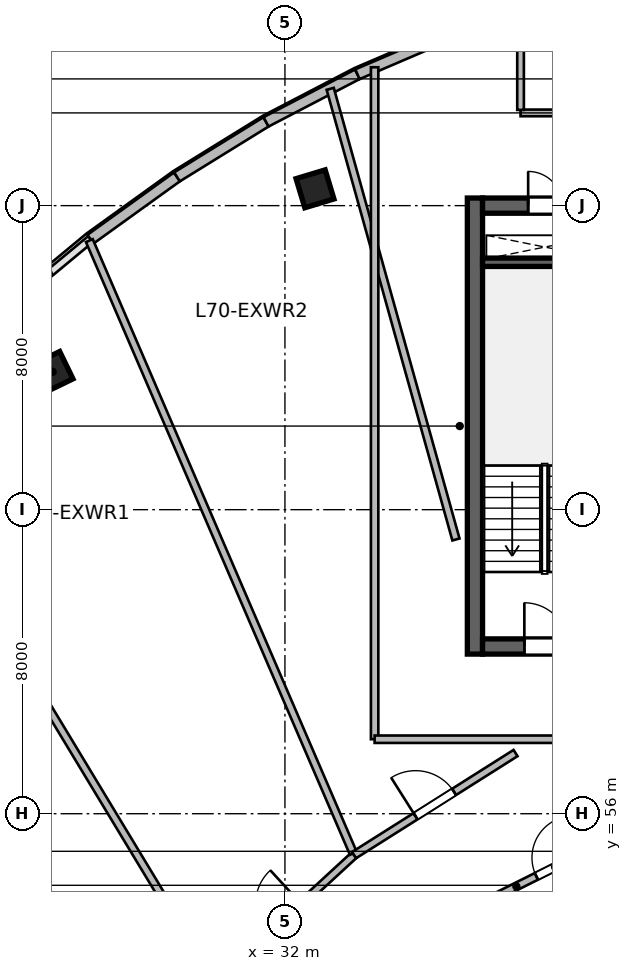
"""IFC4 building model, lengths in metres.
Left out: names, types, materials, properties, quantities, classifications, styles, units other than length and angle.
Written with IfcOpenShell. Run it as: python <this file> out.ifc"""

import sys

from ifc_helpers import new_model, si_unit, direction, frame, frame_2d, origin, origin_2d, place, context, subcontext, project, spatial, rectangle, extrude, source, transform, mapped, element, fill, save


model = new_model("IFC4")
c1 = context("Model", 3, precision=1e-05, world=origin(), true_north=direction((0.0, 1.0)))
c2 = subcontext(c1, "Body", "Model", "MODEL_VIEW")
j1 = project(units=[si_unit("LENGTHUNIT", "METRE"), si_unit("PLANEANGLEUNIT", "RADIAN")], contexts=[c1])
p1 = place(None, origin())
s1 = spatial("IfcSite", under=j1, at=p1, CompositionType="ELEMENT")
p2 = place(p1, origin())
s2 = spatial("IfcBuilding", under=s1, at=p2, CompositionType="ELEMENT")
p3 = place(p2, frame((0.0, 0.0, 287.4)))
s3 = spatial("IfcBuildingStorey", under=s2, at=p3, CompositionType="ELEMENT", Elevation=287.4)
m1 = source(origin(), c2, "Body", "SweptSolid", [
    extrude(rectangle(XDim=12.0, YDim=0.4, at=frame_2d((6.0, 0.0))), origin(), (0.0, 0.0, 1.0), 3.9),
])
p4 = place(p3, frame((37.0, 60.2, 0.0), z_axis=(0.0, 0.0, 1.0), x_axis=(0.0, 1.0, 0.0)))
e1 = element("IfcWall", 1, at=p4, inside=s3, PredefinedType="SHEAR", context=c2, shape_type="MappedRepresentation", body=[
    mapped(m1, transform((0.0, 0.0, 0.0), scale=1.0)),
])
m2 = source(origin(), c2, "Body", "SweptSolid", [
    extrude(rectangle(XDim=21.6, YDim=0.4, at=frame_2d((10.8, 0.0))), origin(), (0.0, 0.0, 1.0), 3.9),
])
p5 = place(p3, frame((37.2, 60.4, 0.0), z_axis=(0.0, 0.0, 1.0), x_axis=(1.0, 0.0, 0.0)))
e2 = element("IfcWall", 2, at=p5, inside=s3, PredefinedType="SHEAR", context=c2, shape_type="MappedRepresentation", body=[
    mapped(m2, transform((0.0, 0.0, 0.0), scale=1.0)),
])
p6 = place(p5, frame((1.1, 0.0, 0.0)))
e3 = element("IfcOpeningElement", 3, at=p6, cuts=e2, PredefinedType="OPENING", context=c2, shape_type="SweptSolid", body=[
    extrude(rectangle(XDim=1.15, YDim=2.15, at=frame_2d((0.575, 1.075))), frame((0.0, 0.21, 0.0), z_axis=(0.0, -1.0, 0.0), x_axis=(1.0, 0.0, 0.0)), (0.0, 0.0, 1.0), 0.42),
])
p7 = place(p5, frame((19.5, 0.0, 0.0)))
e4 = element("IfcOpeningElement", 4, at=p7, cuts=e2, PredefinedType="OPENING", context=c2, shape_type="SweptSolid", body=[
    extrude(rectangle(XDim=0.9, YDim=2.1, at=frame_2d((0.45, 1.05))), frame((0.0, 0.21, 0.0), z_axis=(0.0, -1.0, 0.0), x_axis=(1.0, 0.0, 0.0)), (0.0, 0.0, 1.0), 0.42),
])
p8 = place(p5, frame((12.02, 0.0, 0.0)))
e5 = element("IfcOpeningElement", 5, at=p8, cuts=e2, PredefinedType="OPENING", context=c2, shape_type="SweptSolid", body=[
    extrude(rectangle(XDim=1.6, YDim=2.15, at=frame_2d((0.8, 1.075))), frame((0.0, 0.21, 0.0), z_axis=(0.0, -1.0, 0.0), x_axis=(1.0, 0.0, 0.0)), (0.0, 0.0, 1.0), 0.42),
])
p9 = place(p3, frame((37.2, 72.0, 0.0), z_axis=(0.0, 0.0, 1.0), x_axis=(1.0, 0.0, 0.0)))
e6 = element("IfcWall", 6, at=p9, inside=s3, PredefinedType="SHEAR", context=c2, shape_type="MappedRepresentation", body=[
    mapped(m2, transform((0.0, 0.0, 0.0), scale=1.0)),
])
p10 = place(p9, frame((1.2, 0.0, 0.0)))
e7 = element("IfcOpeningElement", 7, at=p10, cuts=e6, PredefinedType="OPENING", context=c2, shape_type="SweptSolid", body=[
    extrude(rectangle(XDim=0.9, YDim=2.1, at=frame_2d((0.45, 1.05))), frame((0.0, 0.21, 0.0), z_axis=(0.0, -1.0, 0.0), x_axis=(1.0, 0.0, 0.0)), (0.0, 0.0, 1.0), 0.42),
])
p11 = place(p9, frame((14.7, 0.0, 0.0)))
e8 = element("IfcOpeningElement", 8, at=p11, cuts=e6, PredefinedType="OPENING", context=c2, shape_type="SweptSolid", body=[
    extrude(rectangle(XDim=1.2, YDim=2.15, at=frame_2d((0.6, 1.075))), frame((0.0, 0.21, 0.0), z_axis=(0.0, -1.0, 0.0), x_axis=(1.0, 0.0, 0.0)), (0.0, 0.0, 1.0), 0.42),
])
p12 = place(p9, frame((4.15, 0.0, 0.0)))
e9 = element("IfcOpeningElement", 9, at=p12, cuts=e6, PredefinedType="OPENING", context=c2, shape_type="SweptSolid", body=[
    extrude(rectangle(XDim=1.3, YDim=2.15, at=frame_2d((0.65, 1.075))), frame((0.0, 0.21, 0.0), z_axis=(0.0, -1.0, 0.0), x_axis=(1.0, 0.0, 0.0)), (0.0, 0.0, 1.0), 0.42),
])
p13 = place(p9, frame((7.1, 0.0, 0.0)))
e10 = element("IfcOpeningElement", 10, at=p13, cuts=e6, PredefinedType="OPENING", context=c2, shape_type="SweptSolid", body=[
    extrude(rectangle(XDim=0.9, YDim=2.1, at=frame_2d((0.45, 1.05))), frame((0.0, 0.21, 0.0), z_axis=(0.0, -1.0, 0.0), x_axis=(1.0, 0.0, 0.0)), (0.0, 0.0, 1.0), 0.42),
])
m3 = source(origin(), c2, "Body", "SweptSolid", [
    extrude(rectangle(XDim=3.27, YDim=0.22, at=frame_2d((1.635, 0.0))), origin(), (0.0, 0.0, 1.0), 3.9),
])
p14 = place(p3, frame((37.2, 70.51, 0.0), z_axis=(0.0, 0.0, 1.0), x_axis=(1.0, 0.0, 0.0)))
e11 = element("IfcWall", 11, at=p14, inside=s3, PredefinedType="SHEAR", context=c2, shape_type="MappedRepresentation", body=[
    mapped(m3, transform((0.0, 0.0, 0.0), scale=1.0)),
])
m4 = source(origin(), c2, "Body", "SweptSolid", [
    extrude(rectangle(XDim=0.8, YDim=0.8, at=origin_2d()), origin(), (0.0, 0.0, 1.0), 3.9),
])
for number, where, z_axis, x_axis in (
    (12, (25.888, 67.627, 0.0), (0.0, 0.0, 1.0), (-0.436, 0.9, 0.0)),
    (13, (32.791, 72.442, 0.0), (0.0, 0.0, 1.0), (-0.289, 0.957, 0.0)),
):
    element("IfcColumn", number, at=place(p3, frame(where, z_axis=z_axis, x_axis=x_axis)), inside=s3, PredefinedType="COLUMN", context=c2, shape_type="MappedRepresentation", body=[
        mapped(m4, transform((0.0, 0.0, 0.0), scale=1.0)),
    ])
m5 = source(origin(), c2, "Body", "SweptSolid", [
    extrude(rectangle(XDim=2.802, YDim=0.28, at=frame_2d((1.401, 0.0))), origin(), (0.0, 0.0, 1.0), 3.64),
])
p15 = place(p3, frame((26.885, 71.12, 0.0), z_axis=(0.0, 0.0, 1.0), x_axis=(0.811507896482, 0.584341453217, 0.0)))
e14 = element("IfcWall", 14, at=p15, inside=s3, PredefinedType="SOLIDWALL", context=c2, shape_type="MappedRepresentation", body=[
    mapped(m5, transform((0.0, 0.0, 0.0), scale=1.0)),
])
m6 = source(origin(), c2, "Body", "SweptSolid", [
    extrude(rectangle(XDim=2.755, YDim=0.28, at=frame_2d((1.377, 0.0))), origin(), (0.0, 0.0, 1.0), 3.64),
])
p16 = place(p3, frame((29.159, 72.757, 0.0), z_axis=(0.0, 0.0, 1.0), x_axis=(0.850750210743, 0.525570241661, 0.0)))
e15 = element("IfcWall", 15, at=p16, inside=s3, PredefinedType="SOLIDWALL", context=c2, shape_type="MappedRepresentation", body=[
    mapped(m6, transform((0.0, 0.0, 0.0), scale=1.0)),
])
m7 = source(origin(), c2, "Body", "SweptSolid", [
    extrude(rectangle(XDim=2.711, YDim=0.28, at=frame_2d((1.356, 0.0))), origin(), (0.0, 0.0, 1.0), 3.64),
])
p17 = place(p3, frame((31.502, 74.205, 0.0), z_axis=(0.0, 0.0, 1.0), x_axis=(0.886828760751, 0.462098202881, 0.0)))
e16 = element("IfcWall", 16, at=p17, inside=s3, PredefinedType="SOLIDWALL", context=c2, shape_type="MappedRepresentation", body=[
    mapped(m7, transform((0.0, 0.0, 0.0), scale=1.0)),
])
m8 = source(origin(), c2, "Body", "SweptSolid", [
    extrude(rectangle(XDim=2.673, YDim=0.28, at=frame_2d((1.337, 0.0))), origin(), (0.0, 0.0, 1.0), 3.64),
])
p18 = place(p3, frame((33.907, 75.458, 0.0), z_axis=(0.0, 0.0, 1.0), x_axis=(0.919036345912, 0.394172798266, 0.0)))
e17 = element("IfcWall", 17, at=p18, inside=s3, PredefinedType="SOLIDWALL", context=c2, shape_type="MappedRepresentation", body=[
    mapped(m8, transform((0.0, 0.0, 0.0), scale=1.0)),
])
m9 = source(origin(), c2, "Body", "SweptSolid", [
    extrude(rectangle(XDim=4.0, YDim=0.175, at=frame_2d((2.0, 0.0))), origin(), (0.0, 0.0, 1.0), 3.64),
])
p19 = place(p3, frame((38.2, 74.44, 0.0), z_axis=(0.0, 0.0, 1.0), x_axis=(1.0, 0.0, 0.0)))
e18 = element("IfcWall", 18, at=p19, inside=s3, PredefinedType="PARTITIONING", context=c2, shape_type="MappedRepresentation", body=[
    mapped(m9, transform((0.0, 0.0, 0.0), scale=1.0)),
])
p20 = place(p19, frame((2.7, 0.0, 0.0)))
e19 = element("IfcOpeningElement", 19, at=p20, cuts=e18, PredefinedType="OPENING", context=c2, shape_type="SweptSolid", body=[
    extrude(rectangle(XDim=0.9, YDim=2.08, at=frame_2d((0.45, 1.04))), frame((0.0, 0.098, 0.0), z_axis=(0.0, -1.0, 0.0), x_axis=(1.0, 0.0, 0.0)), (0.0, 0.0, 1.0), 0.195),
])
m10 = source(origin(), c2, "Body", "SweptSolid", [
    extrude(rectangle(XDim=2.403, YDim=0.175, at=frame_2d((1.201, 0.0))), origin(), (0.0, 0.0, 1.0), 3.64),
])
p21 = place(p3, frame((38.2, 74.519, 0.0), z_axis=(0.0, 0.0, 1.0), x_axis=(0.0, 1.0, 0.0)))
e20 = element("IfcWall", 20, at=p21, inside=s3, PredefinedType="PARTITIONING", context=c2, shape_type="MappedRepresentation", body=[
    mapped(m10, transform((0.0, 0.0, 0.0), scale=1.0)),
])
m11 = source(origin(), c2, "Body", "SweptSolid", [
    extrude(rectangle(XDim=4.271, YDim=0.195, at=frame_2d((2.135, 0.0))), origin(), (0.0, 0.0, 1.0), 3.64),
])
p22 = place(p3, frame((37.021, 53.552, 0.0), z_axis=(0.0, 0.0, 1.0), x_axis=(0.894061035522, 0.447945158207, 0.0)))
e21 = element("IfcWall", 21, at=p22, inside=s3, PredefinedType="PARTITIONING", context=c2, shape_type="MappedRepresentation", body=[
    mapped(m11, transform((0.0, 0.0, 0.0), scale=1.0)),
])
p23 = place(p22, frame((1.785, 0.0, 0.0)))
e22 = element("IfcOpeningElement", 22, at=p23, cuts=e21, PredefinedType="OPENING", context=c2, shape_type="SweptSolid", body=[
    extrude(rectangle(XDim=1.1, YDim=2.15, at=frame_2d((0.55, 1.075))), frame((0.0, 0.107, 0.0), z_axis=(0.0, -1.0, 0.0), x_axis=(1.0, 0.0, 0.0)), (0.0, 0.0, 1.0), 0.215),
])
m12 = source(origin(), c2, "Body", "SweptSolid", [
    extrude(rectangle(XDim=4.986, YDim=0.195, at=frame_2d((2.493, 0.0))), origin(), (0.0, 0.0, 1.0), 3.64),
])
p24 = place(p3, frame((30.153, 51.533, 0.0), z_axis=(0.0, 0.0, 1.0), x_axis=(0.735595190169, 0.677421372707, 0.0)))
e23 = element("IfcWall", 23, at=p24, inside=s3, PredefinedType="PARTITIONING", context=c2, shape_type="MappedRepresentation", body=[
    mapped(m12, transform((0.0, 0.0, 0.0), scale=1.0)),
])
p25 = place(p24, frame((1.893, 0.0, 0.0)))
e24 = element("IfcOpeningElement", 24, at=p25, cuts=e23, PredefinedType="OPENING", context=c2, shape_type="SweptSolid", body=[
    extrude(rectangle(XDim=1.2, YDim=2.15, at=frame_2d((0.6, 1.075))), frame((0.0, 0.107, 0.0), z_axis=(0.0, -1.0, 0.0), x_axis=(1.0, 0.0, 0.0)), (0.0, 0.0, 1.0), 0.215),
])
m13 = source(origin(), c2, "Body", "SweptSolid", [
    extrude(rectangle(XDim=16.121, YDim=0.195, at=frame_2d((8.061, 0.0))), origin(), (0.0, 0.0, 1.0), 3.64),
])
p26 = place(p3, frame((30.127, 51.575, 0.0), z_axis=(0.0, 0.0, 1.0), x_axis=(-0.517212483904, 0.855857024563, 0.0)))
e25 = element("IfcWall", 25, at=p26, inside=s3, PredefinedType="PARTITIONING", context=c2, shape_type="MappedRepresentation", body=[
    mapped(m13, transform((0.0, 0.0, 0.0), scale=1.0)),
])
m14 = source(origin(), c2, "Body", "SweptSolid", [
    extrude(rectangle(XDim=17.556, YDim=0.195, at=frame_2d((8.778, 0.0))), origin(), (0.0, 0.0, 1.0), 3.64),
])
p27 = place(p3, frame((33.8, 54.958, 0.0), z_axis=(0.0, 0.0, 1.0), x_axis=(-0.395687598313, 0.918385172213, 0.0)))
e26 = element("IfcWall", 26, at=p27, inside=s3, PredefinedType="PARTITIONING", context=c2, shape_type="MappedRepresentation", body=[
    mapped(m14, transform((0.0, 0.0, 0.0), scale=1.0)),
])
m15 = source(origin(), c2, "Body", "SweptSolid", [
    extrude(rectangle(XDim=5.025, YDim=0.195, at=frame_2d((2.513, 0.0))), origin(), (0.0, 0.0, 1.0), 3.64),
])
p28 = place(p3, frame((33.82, 54.911, 0.0), z_axis=(0.0, 0.0, 1.0), x_axis=(0.84532378062, 0.534254345717, 0.0)))
e27 = element("IfcWall", 27, at=p28, inside=s3, PredefinedType="PARTITIONING", context=c2, shape_type="MappedRepresentation", body=[
    mapped(m15, transform((0.0, 0.0, 0.0), scale=1.0)),
])
p29 = place(p28, frame((1.913, 0.0, 0.0)))
e28 = element("IfcOpeningElement", 28, at=p29, cuts=e27, PredefinedType="OPENING", context=c2, shape_type="SweptSolid", body=[
    extrude(rectangle(XDim=1.2, YDim=2.15, at=frame_2d((0.6, 1.075))), frame((0.0, 0.107, 0.0), z_axis=(0.0, -1.0, 0.0), x_axis=(1.0, 0.0, 0.0)), (0.0, 0.0, 1.0), 0.215),
])
m16 = source(origin(), c2, "Body", "SweptSolid", [
    extrude(rectangle(XDim=12.311, YDim=0.195, at=frame_2d((6.155, 0.0))), origin(), (0.0, 0.0, 1.0), 3.64),
])
p30 = place(p3, frame((36.5, 63.216, 0.0), z_axis=(0.0, 0.0, 1.0), x_axis=(-0.268759602651, 0.963207286093, 0.0)))
e29 = element("IfcWall", 29, at=p30, inside=s3, PredefinedType="PARTITIONING", context=c2, shape_type="MappedRepresentation", body=[
    mapped(m16, transform((0.0, 0.0, 0.0), scale=1.0)),
])
m17 = source(origin(), c2, "Body", "SweptSolid", [
    extrude(rectangle(XDim=17.681, YDim=0.195, at=frame_2d((8.84, 0.0))), origin(), (0.0, 0.0, 1.0), 3.64),
])
p31 = place(p3, frame((34.36, 57.96, 0.0), z_axis=(0.0, 0.0, 1.0), x_axis=(0.0, 1.0, 0.0)))
e30 = element("IfcWall", 30, at=p31, inside=s3, PredefinedType="PARTITIONING", context=c2, shape_type="MappedRepresentation", body=[
    mapped(m17, transform((0.0, 0.0, 0.0), scale=1.0)),
])
m18 = source(origin(), c2, "Body", "SweptSolid", [
    extrude(rectangle(XDim=12.39, YDim=0.195, at=frame_2d((6.195, 0.0))), origin(), (0.0, 0.0, 1.0), 3.64),
])
p32 = place(p3, frame((34.36, 57.96, 0.0), z_axis=(0.0, 0.0, 1.0), x_axis=(1.0, 0.0, 0.0)))
e31 = element("IfcWall", 31, at=p32, inside=s3, PredefinedType="PARTITIONING", context=c2, shape_type="MappedRepresentation", body=[
    mapped(m18, transform((0.0, 0.0, 0.0), scale=1.0)),
])
m19 = source(origin(), c2, "Body", "SweptSolid", [
    extrude(rectangle(XDim=1.15, YDim=2.15, at=frame_2d((0.575, 1.075))), frame((0.0, 0.025, 0.0), z_axis=(0.0, -1.0, 0.0), x_axis=(1.0, 0.0, 0.0)), (0.0, 0.0, 1.0), 0.05),
])
p33 = place(p6, origin())
e32 = element("IfcDoor", 32, at=p33, inside=s3, OperationType="SINGLE_SWING_LEFT", PredefinedType="DOOR", context=c2, shape_type="MappedRepresentation", body=[
    mapped(m19, transform((0.0, 0.0, 0.0), scale=1.0)),
])
fill(e3, e32)
m20 = source(origin(), c2, "Body", "SweptSolid", [
    extrude(rectangle(XDim=0.9, YDim=2.1, at=frame_2d((0.45, 1.05))), frame((0.0, 0.025, 0.0), z_axis=(0.0, -1.0, 0.0), x_axis=(1.0, 0.0, 0.0)), (0.0, 0.0, 1.0), 0.05),
])
p34 = place(p10, origin())
e33 = element("IfcDoor", 33, at=p34, inside=s3, OperationType="SINGLE_SWING_LEFT", PredefinedType="DOOR", context=c2, shape_type="MappedRepresentation", body=[
    mapped(m20, transform((0.0, 0.0, 0.0), scale=1.0)),
])
fill(e7, e33)
m21 = source(origin(), c2, "Body", "SweptSolid", [
    extrude(rectangle(XDim=1.1, YDim=2.15, at=frame_2d((0.55, 1.075))), frame((0.0, 0.025, 0.0), z_axis=(0.0, -1.0, 0.0), x_axis=(1.0, 0.0, 0.0)), (0.0, 0.0, 1.0), 0.05),
])
p35 = place(p23, origin())
e34 = element("IfcDoor", 34, at=p35, inside=s3, OperationType="SINGLE_SWING_RIGHT", PredefinedType="DOOR", context=c2, shape_type="MappedRepresentation", body=[
    mapped(m21, transform((0.0, 0.0, 0.0), scale=1.0)),
])
fill(e22, e34)
m22 = source(origin(), c2, "Body", "SweptSolid", [
    extrude(rectangle(XDim=1.2, YDim=2.15, at=frame_2d((0.6, 1.075))), frame((0.0, 0.025, 0.0), z_axis=(0.0, -1.0, 0.0), x_axis=(1.0, 0.0, 0.0)), (0.0, 0.0, 1.0), 0.05),
])
p36 = place(p29, origin())
e35 = element("IfcDoor", 35, at=p36, inside=s3, OperationType="SINGLE_SWING_LEFT", PredefinedType="DOOR", context=c2, shape_type="MappedRepresentation", body=[
    mapped(m22, transform((0.0, 0.0, 0.0), scale=1.0)),
])
fill(e28, e35)
save(model, sys.argv[1])
